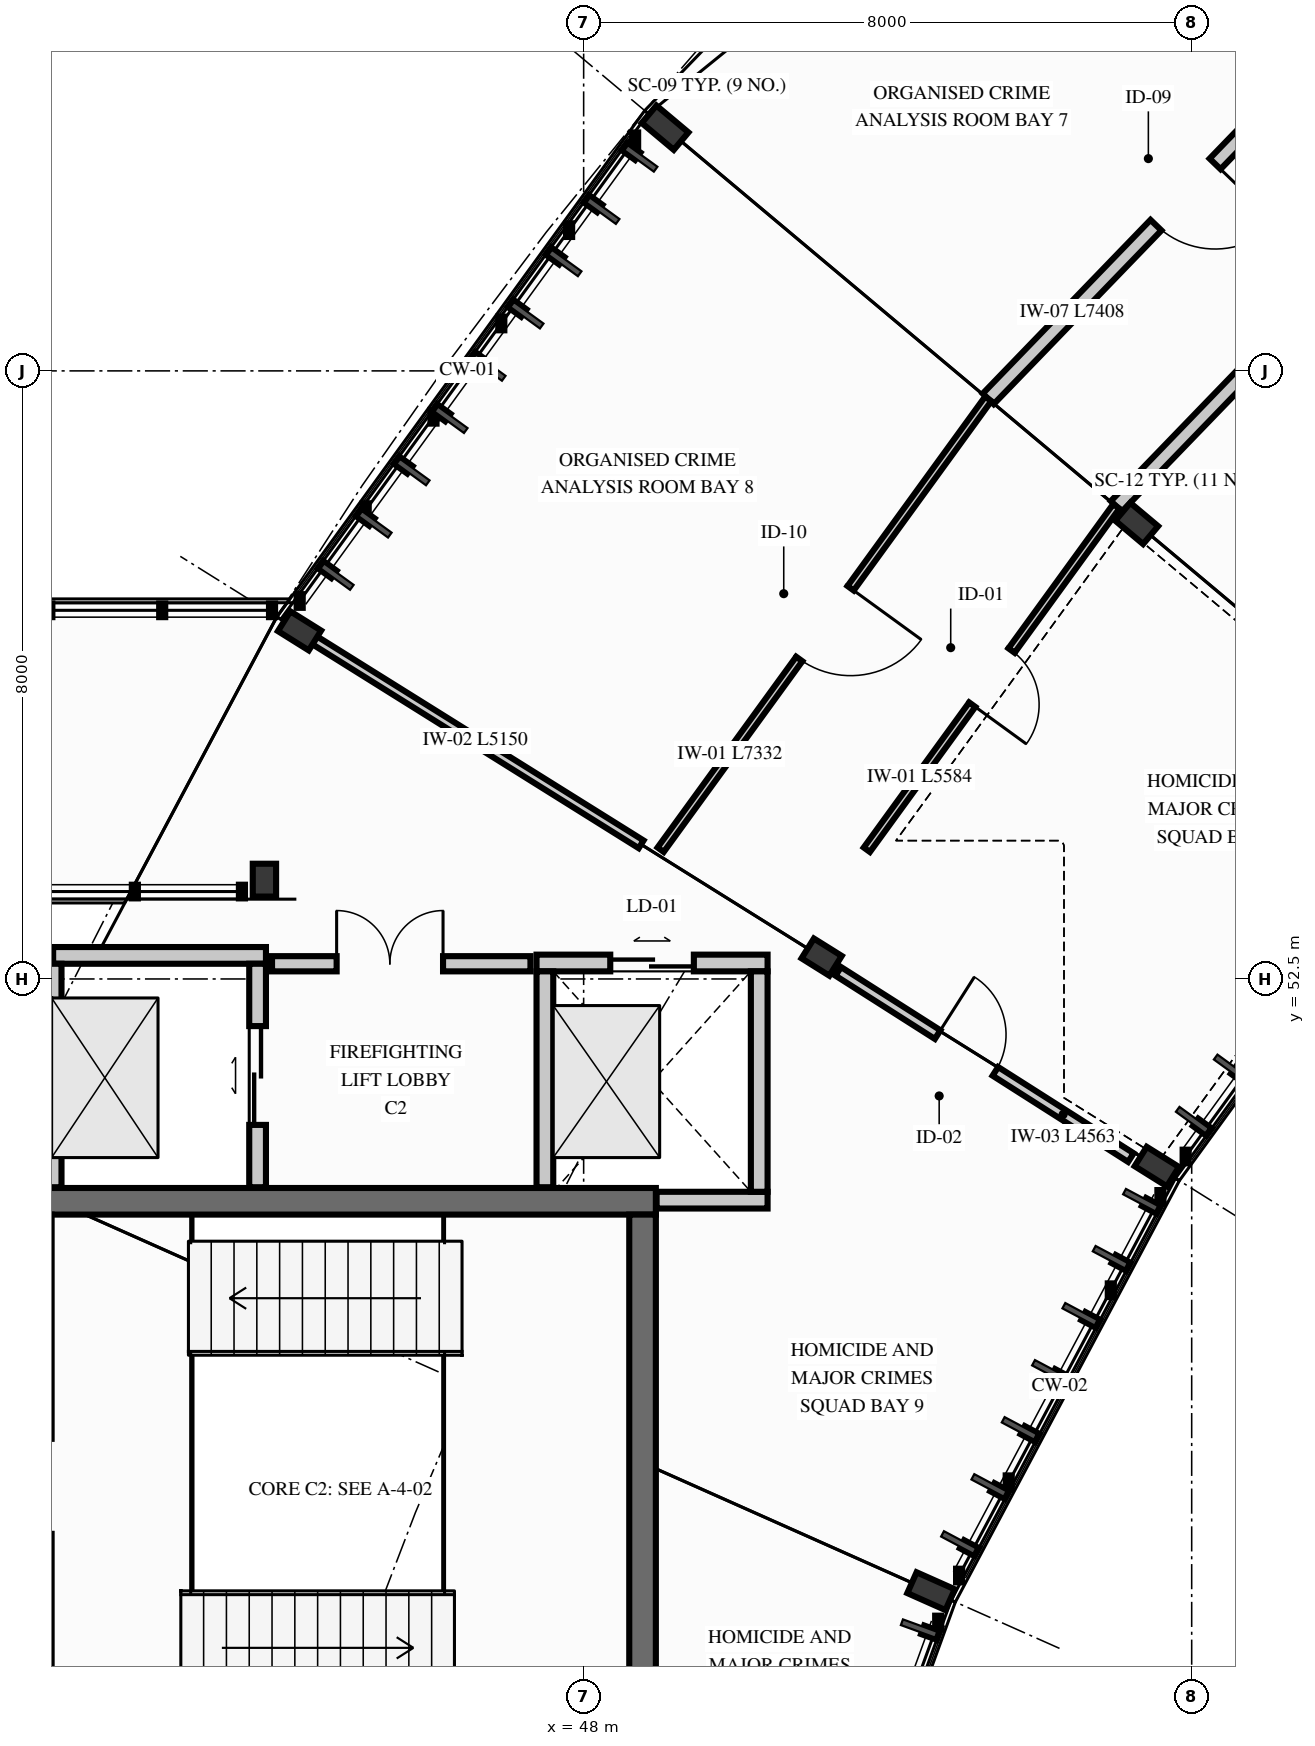
"""IFC4 building model, lengths in metres.
Left out: names, types, materials, properties, quantities, classifications, styles, units other than length and angle.
Written with IfcOpenShell. Run it as: python <this file> out.ifc"""

import sys

from ifc_helpers import new_model, si_unit, direction, frame, frame_2d, origin, origin_2d, place, context, subcontext, project, spatial, rectangle, i_section, extrude, element, fill, save


model = new_model("IFC4")
c1 = context("Model", 3, precision=1e-05, world=origin(), true_north=direction((0.0, 1.0)))
c2 = subcontext(c1, "Body", "Model", "MODEL_VIEW")
j1 = project(units=[si_unit("LENGTHUNIT", "METRE"), si_unit("PLANEANGLEUNIT", "RADIAN")], contexts=[c1])
p1 = place(None, origin())
s1 = spatial("IfcSite", under=j1, at=p1, CompositionType="ELEMENT")
p2 = place(p1, origin())
s2 = spatial("IfcBuilding", under=s1, at=p2, CompositionType="ELEMENT")
p3 = place(p2, frame((0.0, 0.0, 9.3)))
s3 = spatial("IfcBuildingStorey", under=s2, at=p3, CompositionType="ELEMENT", Elevation=9.3)
p4 = place(p3, frame((40.65, 49.575, 0.0), z_axis=(0.0, 0.0, 1.0), x_axis=(1.0, 0.0, 0.0)))
e1 = element("IfcWall", 1, at=p4, inside=s3, PredefinedType="SHEAR", context=c2, shape_type="SweptSolid", body=[
    extrude(rectangle(XDim=8.3, YDim=0.35, at=frame_2d((4.15, 0.0))), origin(), (0.0, 0.0, 1.0), 4.0),
])
p5 = place(p3, frame((48.775, 42.6, 0.0), z_axis=(0.0, 0.0, 1.0), x_axis=(0.0, 1.0, 0.0)))
e2 = element("IfcWall", 2, at=p5, inside=s3, PredefinedType="SHEAR", context=c2, shape_type="SweptSolid", body=[
    extrude(rectangle(XDim=6.8, YDim=0.35, at=frame_2d((3.4, 0.0))), origin(), (0.0, 0.0, 1.0), 4.0),
])
p6 = place(p3, frame((55.277, 58.493, 0.0), z_axis=(0.0, 0.0, 1.0), x_axis=(0.642787609687, 0.766044443119, 0.0)))
e3 = element("IfcColumn", 3, at=p6, inside=s3, PredefinedType="COLUMN", context=c2, shape_type="SweptSolid", body=[
    extrude(i_section(OverallWidth=0.307, OverallDepth=0.478, WebThickness=0.021, FlangeThickness=0.04, FilletRadius=0.027, at=origin_2d()), origin(), (0.0, 0.0, 1.0), 4.2),
])
p7 = place(p3, frame((49.072, 63.699, 0.0), z_axis=(0.0, 0.0, 1.0), x_axis=(0.642787609687, 0.766044443119, 0.0)))
e4 = element("IfcColumn", 4, at=p7, inside=s3, PredefinedType="COLUMN", context=c2, shape_type="SweptSolid", body=[
    extrude(i_section(OverallWidth=0.3, OverallDepth=0.55, WebThickness=0.015, FlangeThickness=0.029, FilletRadius=0.027, at=origin_2d()), origin(), (0.0, 0.0, 1.0), 4.2),
])
p8 = place(p3, frame((55.541, 50.032, 0.0), z_axis=(0.0, 0.0, 1.0), x_axis=(0.529919264233, 0.848048096156, 0.0)))
e5 = element("IfcColumn", 5, at=p8, inside=s3, PredefinedType="COLUMN", context=c2, shape_type="SweptSolid", body=[
    extrude(i_section(OverallWidth=0.3, OverallDepth=0.5, WebThickness=0.014, FlangeThickness=0.028, FilletRadius=0.027, at=origin_2d()), origin(), (0.0, 0.0, 1.0), 4.2),
])
p9 = place(p3, frame((51.131, 52.787, 0.0), z_axis=(0.0, 0.0, 1.0), x_axis=(0.529919264233, 0.848048096156, 0.0)))
e6 = element("IfcColumn", 6, at=p9, inside=s3, PredefinedType="COLUMN", context=c2, shape_type="SweptSolid", body=[
    extrude(i_section(OverallWidth=0.307, OverallDepth=0.432, WebThickness=0.021, FlangeThickness=0.04, FilletRadius=0.027, at=origin_2d()), origin(), (0.0, 0.0, 1.0), 4.2),
])
p10 = place(p3, frame((44.262, 57.08, 0.0), z_axis=(0.0, 0.0, 1.0), x_axis=(0.529919264233, 0.848048096156, 0.0)))
e7 = element("IfcColumn", 7, at=p10, inside=s3, PredefinedType="COLUMN", context=c2, shape_type="SweptSolid", body=[
    extrude(i_section(OverallWidth=0.307, OverallDepth=0.478, WebThickness=0.021, FlangeThickness=0.04, FilletRadius=0.027, at=origin_2d()), origin(), (0.0, 0.0, 1.0), 4.2),
])
p11 = place(p3, frame((52.571, 44.446, 0.0), z_axis=(0.0, 0.0, 1.0), x_axis=(0.406736643076, 0.913545457643, 0.0)))
e8 = element("IfcColumn", 8, at=p11, inside=s3, PredefinedType="COLUMN", context=c2, shape_type="SweptSolid", body=[
    extrude(i_section(OverallWidth=0.3, OverallDepth=0.55, WebThickness=0.015, FlangeThickness=0.029, FilletRadius=0.027, at=origin_2d()), origin(), (0.0, 0.0, 1.0), 4.2),
])
p12 = place(p3, frame((43.8, 53.8, 0.0), z_axis=(0.0, 0.0, 1.0), x_axis=(1.0, 0.0, 0.0)))
e9 = element("IfcColumn", 9, at=p12, inside=s3, PredefinedType="COLUMN", context=c2, shape_type="SweptSolid", body=[
    extrude(i_section(OverallWidth=0.307, OverallDepth=0.432, WebThickness=0.021, FlangeThickness=0.04, FilletRadius=0.027, at=origin_2d()), origin(), (0.0, 0.0, 1.0), 4.2),
])
p13 = place(p3, frame((41.02, 52.81, 0.0), z_axis=(0.0, 0.0, 1.0), x_axis=(1.0, 0.0, 0.0)))
e10 = element("IfcWall", 10, at=p13, inside=s3, PredefinedType="PARTITIONING", context=c2, shape_type="SweptSolid", body=[
    extrude(rectangle(XDim=2.8, YDim=0.22, at=frame_2d((1.4, 0.0))), origin(), (0.0, 0.0, 1.0), 3.92),
])
p14 = place(p3, frame((41.02, 49.76, 0.0), z_axis=(0.0, 0.0, 1.0), x_axis=(0.0, 1.0, 0.0)))
e11 = element("IfcWall", 11, at=p14, inside=s3, PredefinedType="PARTITIONING", context=c2, shape_type="SweptSolid", body=[
    extrude(rectangle(XDim=2.94, YDim=0.22, at=frame_2d((1.47, 0.0))), origin(), (0.0, 0.0, 1.0), 3.92),
])
p15 = place(p3, frame((43.71, 49.76, 0.0), z_axis=(0.0, 0.0, 1.0), x_axis=(0.0, 1.0, 0.0)))
e12 = element("IfcWall", 12, at=p15, inside=s3, PredefinedType="PARTITIONING", context=c2, shape_type="SweptSolid", body=[
    extrude(rectangle(XDim=2.94, YDim=0.22, at=frame_2d((1.47, 0.0))), origin(), (0.0, 0.0, 1.0), 3.92),
])
p16 = place(p15, frame((0.82, 0.0, 0.0)))
e13 = element("IfcOpeningElement", 13, at=p16, cuts=e12, PredefinedType="OPENING", context=c2, shape_type="SweptSolid", body=[
    extrude(rectangle(XDim=1.3, YDim=2.2, at=frame_2d((0.65, 1.1))), frame((0.0, 0.12, 0.0), z_axis=(0.0, -1.0, 0.0), x_axis=(1.0, 0.0, 0.0)), (0.0, 0.0, 1.0), 0.24),
])
p17 = place(p3, frame((48.96, 49.59, 0.0), z_axis=(0.0, 0.0, 1.0), x_axis=(1.0, 0.0, 0.0)))
e14 = element("IfcWall", 14, at=p17, inside=s3, PredefinedType="PARTITIONING", context=c2, shape_type="SweptSolid", body=[
    extrude(rectangle(XDim=1.46, YDim=0.22, at=frame_2d((0.73, 0.0))), origin(), (0.0, 0.0, 1.0), 3.92),
])
p18 = place(p3, frame((47.38, 52.71, 0.0), z_axis=(0.0, 0.0, 1.0), x_axis=(1.0, 0.0, 0.0)))
e15 = element("IfcWall", 15, at=p18, inside=s3, PredefinedType="PARTITIONING", context=c2, shape_type="SweptSolid", body=[
    extrude(rectangle(XDim=3.04, YDim=0.22, at=frame_2d((1.52, 0.0))), origin(), (0.0, 0.0, 1.0), 3.92),
])
p19 = place(p18, frame((0.97, 0.0, 0.0)))
e16 = element("IfcOpeningElement", 16, at=p19, cuts=e15, PredefinedType="OPENING", context=c2, shape_type="SweptSolid", body=[
    extrude(rectangle(XDim=1.1, YDim=2.15, at=frame_2d((0.55, 1.075))), frame((0.0, 0.12, 0.0), z_axis=(0.0, -1.0, 0.0), x_axis=(1.0, 0.0, 0.0)), (0.0, 0.0, 1.0), 0.24),
])
p20 = place(p3, frame((47.49, 49.76, 0.0), z_axis=(0.0, 0.0, 1.0), x_axis=(0.0, 1.0, 0.0)))
e17 = element("IfcWall", 17, at=p20, inside=s3, PredefinedType="PARTITIONING", context=c2, shape_type="SweptSolid", body=[
    extrude(rectangle(XDim=2.84, YDim=0.22, at=frame_2d((1.42, 0.0))), origin(), (0.0, 0.0, 1.0), 3.92),
])
p21 = place(p3, frame((50.31, 49.7, 0.0), z_axis=(0.0, 0.0, 1.0), x_axis=(0.0, 1.0, 0.0)))
e18 = element("IfcWall", 18, at=p21, inside=s3, PredefinedType="PARTITIONING", context=c2, shape_type="SweptSolid", body=[
    extrude(rectangle(XDim=2.9, YDim=0.22, at=frame_2d((1.45, 0.0))), origin(), (0.0, 0.0, 1.0), 3.92),
])
p22 = place(p3, frame((43.9, 52.7, 0.0), z_axis=(0.0, 0.0, 1.0), x_axis=(1.0, 0.0, 0.0)))
e19 = element("IfcWall", 19, at=p22, inside=s3, PredefinedType="PARTITIONING", context=c2, shape_type="SweptSolid", body=[
    extrude(rectangle(XDim=3.4, YDim=0.2, at=frame_2d((1.7, 0.0))), origin(), (0.0, 0.0, 1.0), 3.92),
])
p23 = place(p22, frame((0.85, 0.0, 0.0)))
e20 = element("IfcOpeningElement", 20, at=p23, cuts=e19, PredefinedType="OPENING", context=c2, shape_type="SweptSolid", body=[
    extrude(rectangle(XDim=1.4, YDim=2.25, at=frame_2d((0.7, 1.125))), frame((0.0, 0.11, 0.0), z_axis=(0.0, -1.0, 0.0), x_axis=(1.0, 0.0, 0.0)), (0.0, 0.0, 1.0), 0.22),
])
p24 = place(p3, frame((51.35, 52.6, 0.0), z_axis=(0.0, 0.0, 1.0), x_axis=(0.84363284859, -0.536920493909, 0.0)))
e21 = element("IfcWall", 21, at=p24, inside=s3, PredefinedType="PARTITIONING", context=c2, shape_type="SweptSolid", body=[
    extrude(rectangle(XDim=4.563, YDim=0.135, at=frame_2d((2.282, 0.0))), origin(), (0.0, 0.0, 1.0), 3.6),
])
p25 = place(p24, frame((1.55, 0.0, 0.0)))
e22 = element("IfcOpeningElement", 22, at=p25, cuts=e21, PredefinedType="OPENING", context=c2, shape_type="SweptSolid", body=[
    extrude(rectangle(XDim=0.9, YDim=2.1, at=frame_2d((0.45, 1.05))), frame((0.0, 0.077, 0.0), z_axis=(0.0, -1.0, 0.0), x_axis=(1.0, 0.0, 0.0)), (0.0, 0.0, 1.0), 0.155),
])
p26 = place(p3, frame((59.941, 63.826, 0.0), z_axis=(0.0, 0.0, 1.0), x_axis=(-0.694674270111, -0.719324445884, 0.0)))
e23 = element("IfcWall", 23, at=p26, inside=s3, PredefinedType="PARTITIONING", context=c2, shape_type="SweptSolid", body=[
    extrude(rectangle(XDim=7.101, YDim=0.2, at=frame_2d((3.551, 0.0))), origin(), (0.0, 0.0, 1.0), 3.92),
])
p27 = place(p26, frame((2.983, 0.0, 0.0)))
e24 = element("IfcOpeningElement", 24, at=p27, cuts=e23, PredefinedType="OPENING", context=c2, shape_type="SweptSolid", body=[
    extrude(rectangle(XDim=1.18, YDim=2.24, at=frame_2d((0.59, 1.12))), frame((0.0, 0.11, 0.0), z_axis=(0.0, -1.0, 0.0), x_axis=(1.0, 0.0, 0.0)), (0.0, 0.0, 1.0), 0.22),
])
p28 = place(p3, frame((58.469, 65.461, 0.0), z_axis=(0.0, 0.0, 1.0), x_axis=(-0.694673907436, -0.71932479613, 0.0)))
e25 = element("IfcWall", 25, at=p28, inside=s3, PredefinedType="PARTITIONING", context=c2, shape_type="SweptSolid", body=[
    extrude(rectangle(XDim=7.408, YDim=0.2, at=frame_2d((3.704, 0.0))), origin(), (0.0, 0.0, 1.0), 3.92),
])
p29 = place(p28, frame((3.111, 0.0, 0.0)))
e26 = element("IfcOpeningElement", 26, at=p29, cuts=e25, PredefinedType="OPENING", context=c2, shape_type="SweptSolid", body=[
    extrude(rectangle(XDim=1.12, YDim=2.2, at=frame_2d((0.56, 1.1))), frame((0.0, 0.11, 0.0), z_axis=(0.0, -1.0, 0.0), x_axis=(1.0, 0.0, 0.0)), (0.0, 0.0, 1.0), 0.22),
])
p30 = place(p3, frame((55.008, 58.718, 0.0), z_axis=(0.0, 0.0, 1.0), x_axis=(-0.587773920785, -0.809025227076, 0.0)))
e27 = element("IfcWall", 27, at=p30, inside=s3, PredefinedType="PARTITIONING", context=c2, shape_type="SweptSolid", body=[
    extrude(rectangle(XDim=5.584, YDim=0.1, at=frame_2d((2.792, 0.0))), origin(), (0.0, 0.0, 1.0), 3.92),
])
p31 = place(p30, frame((2.345, 0.0, 0.0)))
e28 = element("IfcOpeningElement", 28, at=p31, cuts=e27, PredefinedType="OPENING", context=c2, shape_type="SweptSolid", body=[
    extrude(rectangle(XDim=0.88, YDim=2.1, at=frame_2d((0.44, 1.05))), frame((0.0, 0.06, 0.0), z_axis=(0.0, -1.0, 0.0), x_axis=(1.0, 0.0, 0.0)), (0.0, 0.0, 1.0), 0.12),
])
p32 = place(p3, frame((53.323, 60.132, 0.0), z_axis=(0.0, 0.0, 1.0), x_axis=(-0.587773694682, -0.809025391344, 0.0)))
e29 = element("IfcWall", 29, at=p32, inside=s3, PredefinedType="PARTITIONING", context=c2, shape_type="SweptSolid", body=[
    extrude(rectangle(XDim=7.333, YDim=0.1, at=frame_2d((3.666, 0.0))), origin(), (0.0, 0.0, 1.0), 3.92),
])
p33 = place(p32, frame((3.08, 0.0, 0.0)))
e30 = element("IfcOpeningElement", 30, at=p33, cuts=e29, PredefinedType="OPENING", context=c2, shape_type="SweptSolid", body=[
    extrude(rectangle(XDim=1.15, YDim=2.2, at=frame_2d((0.575, 1.1))), frame((0.0, 0.06, 0.0), z_axis=(0.0, -1.0, 0.0), x_axis=(1.0, 0.0, 0.0)), (0.0, 0.0, 1.0), 0.12),
])
p34 = place(p3, frame((48.757, 54.271, 0.0), z_axis=(0.0, 0.0, 1.0), x_axis=(-0.848054228257, 0.529909450694, 0.0)))
e31 = element("IfcWall", 31, at=p34, inside=s3, PredefinedType="PARTITIONING", context=c2, shape_type="SweptSolid", body=[
    extrude(rectangle(XDim=5.15, YDim=0.12, at=frame_2d((2.575, 0.0))), origin(), (0.0, 0.0, 1.0), 3.55),
])
p35 = place(p16, origin())
e32 = element("IfcDoor", 32, at=p35, inside=s3, OperationType="DOUBLE_DOOR_SLIDING", PredefinedType="DOOR", context=c2, shape_type="SweptSolid", body=[
    extrude(rectangle(XDim=1.3, YDim=2.2, at=frame_2d((0.65, 1.1))), frame((0.0, 0.025, 0.0), z_axis=(0.0, -1.0, 0.0), x_axis=(1.0, 0.0, 0.0)), (0.0, 0.0, 1.0), 0.05),
])
fill(e13, e32)
p36 = place(p19, origin())
e33 = element("IfcDoor", 33, at=p36, inside=s3, OperationType="DOUBLE_DOOR_SLIDING", PredefinedType="DOOR", context=c2, shape_type="SweptSolid", body=[
    extrude(rectangle(XDim=1.1, YDim=2.15, at=frame_2d((0.55, 1.075))), frame((0.0, 0.025, 0.0), z_axis=(0.0, -1.0, 0.0), x_axis=(1.0, 0.0, 0.0)), (0.0, 0.0, 1.0), 0.05),
])
fill(e16, e33)
p37 = place(p23, origin())
e34 = element("IfcDoor", 34, at=p37, inside=s3, OperationType="DOUBLE_DOOR_SINGLE_SWING", PredefinedType="DOOR", context=c2, shape_type="SweptSolid", body=[
    extrude(rectangle(XDim=1.4, YDim=2.25, at=frame_2d((0.7, 1.125))), frame((0.0, 0.025, 0.0), z_axis=(0.0, -1.0, 0.0), x_axis=(1.0, 0.0, 0.0)), (0.0, 0.0, 1.0), 0.05),
])
fill(e20, e34)
p38 = place(p25, origin())
e35 = element("IfcDoor", 35, at=p38, inside=s3, OperationType="SINGLE_SWING_LEFT", PredefinedType="DOOR", context=c2, shape_type="SweptSolid", body=[
    extrude(rectangle(XDim=0.9, YDim=2.1, at=frame_2d((0.45, 1.05))), frame((0.0, 0.025, 0.0), z_axis=(0.0, -1.0, 0.0), x_axis=(1.0, 0.0, 0.0)), (0.0, 0.0, 1.0), 0.05),
])
fill(e22, e35)
p39 = place(p29, origin())
e36 = element("IfcDoor", 36, at=p39, inside=s3, OperationType="SINGLE_SWING_LEFT", PredefinedType="DOOR", context=c2, shape_type="SweptSolid", body=[
    extrude(rectangle(XDim=1.12, YDim=2.2, at=frame_2d((0.56, 1.1))), frame((0.0, 0.025, 0.0), z_axis=(0.0, -1.0, 0.0), x_axis=(1.0, 0.0, 0.0)), (0.0, 0.0, 1.0), 0.05),
])
fill(e26, e36)
p40 = place(p31, origin())
e37 = element("IfcDoor", 37, at=p40, inside=s3, OperationType="SINGLE_SWING_RIGHT", PredefinedType="DOOR", context=c2, shape_type="SweptSolid", body=[
    extrude(rectangle(XDim=0.88, YDim=2.1, at=frame_2d((0.44, 1.05))), frame((0.0, 0.025, 0.0), z_axis=(0.0, -1.0, 0.0), x_axis=(1.0, 0.0, 0.0)), (0.0, 0.0, 1.0), 0.05),
])
fill(e28, e37)
p41 = place(p33, origin())
e38 = element("IfcDoor", 38, at=p41, inside=s3, OperationType="SINGLE_SWING_LEFT", PredefinedType="DOOR", context=c2, shape_type="SweptSolid", body=[
    extrude(rectangle(XDim=1.15, YDim=2.2, at=frame_2d((0.575, 1.1))), frame((0.0, 0.025, 0.0), z_axis=(0.0, -1.0, 0.0), x_axis=(1.0, 0.0, 0.0)), (0.0, 0.0, 1.0), 0.05),
])
fill(e30, e38)
save(model, sys.argv[1])
